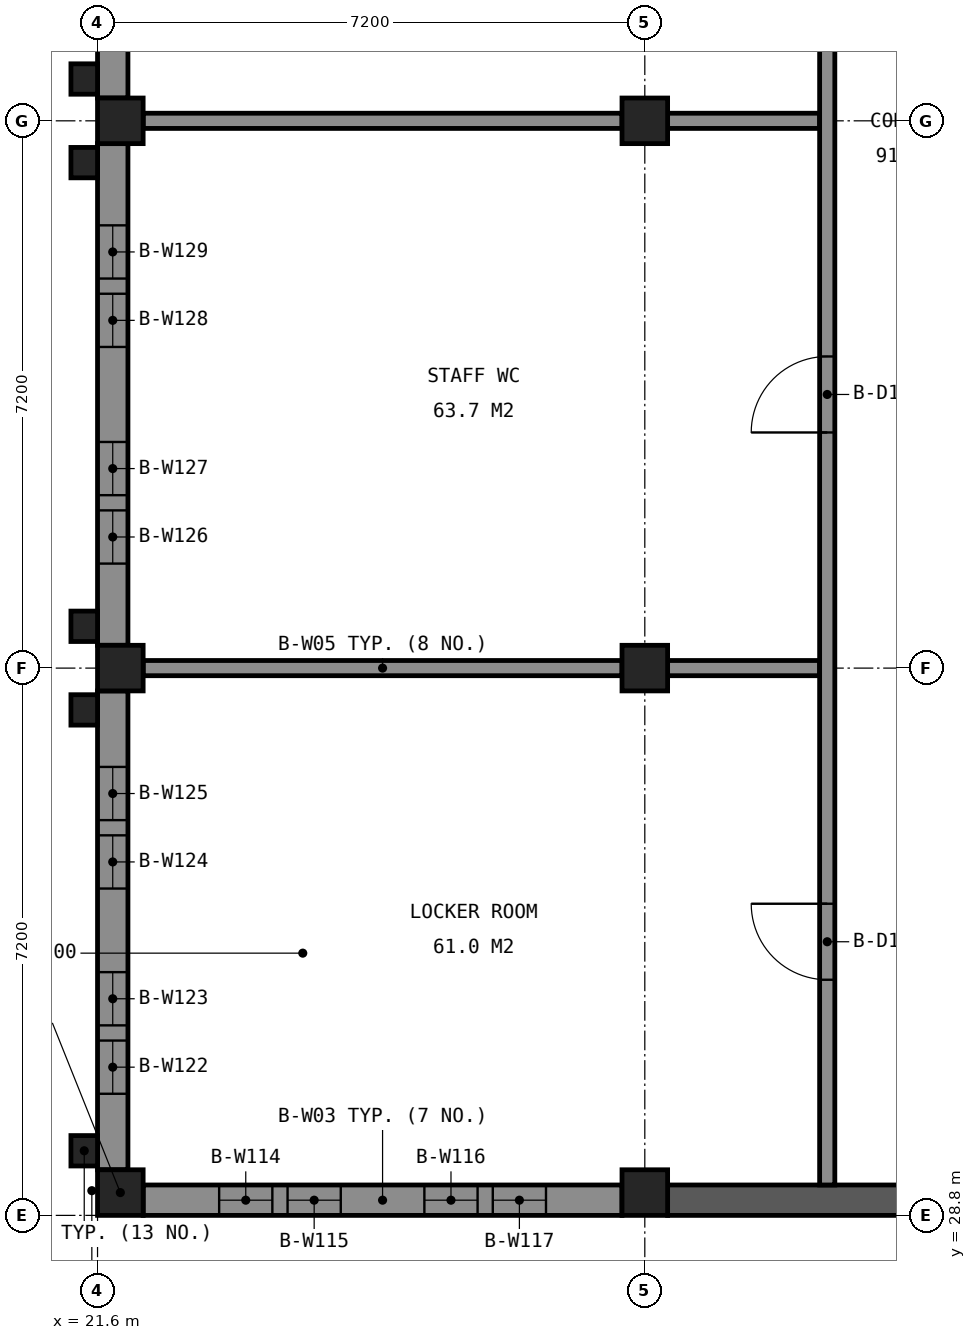
"""IFC4 building model, lengths in metres.
Left out: names, types, materials, properties, quantities, classifications, styles, units other than length and angle.
Written with IfcOpenShell. Run it as: python <this file> out.ifc"""

import sys

from ifc_helpers import new_model, si_unit, direction, frame, frame_2d, origin, origin_2d, place, context, subcontext, project, spatial, rectangle, extrude, element, fill, save


model = new_model("IFC4")
c1 = context("Model", 3, precision=1e-05, world=origin(), true_north=direction((0.0, 1.0)))
c2 = subcontext(c1, "Body", "Model", "MODEL_VIEW")
j1 = project(units=[si_unit("LENGTHUNIT", "METRE"), si_unit("PLANEANGLEUNIT", "RADIAN")], contexts=[c1])
p1 = place(None, origin())
s1 = spatial("IfcSite", under=j1, at=p1, CompositionType="ELEMENT")
p2 = place(p1, origin())
s2 = spatial("IfcBuilding", under=s1, at=p2, CompositionType="ELEMENT")
p3 = place(p2, frame((0.0, 0.0, 9.6)))
s3 = spatial("IfcBuildingStorey", under=s2, at=p3, CompositionType="ELEMENT", Elevation=9.6)
for number, where, z_axis, x_axis in (
    (1, (21.9, 29.1, 0.0), (0.0, 0.0, 1.0), (1.0, 0.0, 0.0)),
    (2, (21.9, 36.0, 0.0), (0.0, 0.0, 1.0), (1.0, 0.0, 0.0)),
    (3, (21.9, 43.2, 0.0), (0.0, 0.0, 1.0), (1.0, 0.0, 0.0)),
    (4, (28.8, 29.1, 0.0), (0.0, 0.0, 1.0), (1.0, 0.0, 0.0)),
    (5, (28.8, 36.0, 0.0), (0.0, 0.0, 1.0), (1.0, 0.0, 0.0)),
    (6, (28.8, 43.2, 0.0), (0.0, 0.0, 1.0), (1.0, 0.0, 0.0)),
):
    element("IfcColumn", number, at=place(p3, frame(where, z_axis=z_axis, x_axis=x_axis)), inside=s3, PredefinedType="COLUMN", context=c2, shape_type="SweptSolid", body=[
        extrude(rectangle(XDim=0.6, YDim=0.6, at=origin_2d()), origin(), (0.0, 0.0, 1.0), 4.8),
    ])
p4 = place(p3, frame((29.1, 29.0, 0.0), z_axis=(0.0, 0.0, 1.0), x_axis=(1.0, 0.0, 0.0)))
e7 = element("IfcWall", 7, at=p4, inside=s3, PredefinedType="SHEAR", context=c2, shape_type="SweptSolid", body=[
    extrude(rectangle(XDim=13.7, YDim=0.4, at=frame_2d((6.85, 0.0))), origin(), (0.0, 0.0, 1.0), 4.55),
])
p5 = place(p3, frame((22.2, 29.0, 0.0), z_axis=(0.0, 0.0, 1.0), x_axis=(1.0, 0.0, 0.0)))
e8 = element("IfcWall", 8, at=p5, inside=s3, PredefinedType="SOLIDWALL", context=c2, shape_type="SweptSolid", body=[
    extrude(rectangle(XDim=6.3, YDim=0.4, at=frame_2d((3.15, 0.0))), origin(), (0.0, 0.0, 1.0), 3.95),
])
p6 = place(p5, frame((1.0, 0.0, 0.9)))
e9 = element("IfcOpeningElement", 9, at=p6, cuts=e8, PredefinedType="OPENING", context=c2, shape_type="SweptSolid", body=[
    extrude(rectangle(XDim=0.7, YDim=2.4, at=frame_2d((0.35, 1.2))), frame((0.0, 0.21, 0.0), z_axis=(0.0, -1.0, 0.0), x_axis=(1.0, 0.0, 0.0)), (0.0, 0.0, 1.0), 0.42),
])
p7 = place(p5, frame((1.9, 0.0, 0.9)))
e10 = element("IfcOpeningElement", 10, at=p7, cuts=e8, PredefinedType="OPENING", context=c2, shape_type="SweptSolid", body=[
    extrude(rectangle(XDim=0.7, YDim=2.4, at=frame_2d((0.35, 1.2))), frame((0.0, 0.21, 0.0), z_axis=(0.0, -1.0, 0.0), x_axis=(1.0, 0.0, 0.0)), (0.0, 0.0, 1.0), 0.42),
])
p8 = place(p5, frame((3.7, 0.0, 0.9)))
e11 = element("IfcOpeningElement", 11, at=p8, cuts=e8, PredefinedType="OPENING", context=c2, shape_type="SweptSolid", body=[
    extrude(rectangle(XDim=0.7, YDim=2.4, at=frame_2d((0.35, 1.2))), frame((0.0, 0.21, 0.0), z_axis=(0.0, -1.0, 0.0), x_axis=(1.0, 0.0, 0.0)), (0.0, 0.0, 1.0), 0.42),
])
p9 = place(p5, frame((4.6, 0.0, 0.9)))
e12 = element("IfcOpeningElement", 12, at=p9, cuts=e8, PredefinedType="OPENING", context=c2, shape_type="SweptSolid", body=[
    extrude(rectangle(XDim=0.7, YDim=2.4, at=frame_2d((0.35, 1.2))), frame((0.0, 0.21, 0.0), z_axis=(0.0, -1.0, 0.0), x_axis=(1.0, 0.0, 0.0)), (0.0, 0.0, 1.0), 0.42),
])
p10 = place(p3, frame((21.8, 29.4, 0.0), z_axis=(0.0, 0.0, 1.0), x_axis=(0.0, 1.0, 0.0)))
e13 = element("IfcWall", 13, at=p10, inside=s3, PredefinedType="SOLIDWALL", context=c2, shape_type="SweptSolid", body=[
    extrude(rectangle(XDim=6.3, YDim=0.4, at=frame_2d((3.15, 0.0))), origin(), (0.0, 0.0, 1.0), 3.95),
])
p11 = place(p10, frame((1.0, 0.0, 0.9)))
e14 = element("IfcOpeningElement", 14, at=p11, cuts=e13, PredefinedType="OPENING", context=c2, shape_type="SweptSolid", body=[
    extrude(rectangle(XDim=0.7, YDim=2.4, at=frame_2d((0.35, 1.2))), frame((0.0, 0.21, 0.0), z_axis=(0.0, -1.0, 0.0), x_axis=(1.0, 0.0, 0.0)), (0.0, 0.0, 1.0), 0.42),
])
p12 = place(p10, frame((1.9, 0.0, 0.9)))
e15 = element("IfcOpeningElement", 15, at=p12, cuts=e13, PredefinedType="OPENING", context=c2, shape_type="SweptSolid", body=[
    extrude(rectangle(XDim=0.7, YDim=2.4, at=frame_2d((0.35, 1.2))), frame((0.0, 0.21, 0.0), z_axis=(0.0, -1.0, 0.0), x_axis=(1.0, 0.0, 0.0)), (0.0, 0.0, 1.0), 0.42),
])
p13 = place(p10, frame((3.7, 0.0, 0.9)))
e16 = element("IfcOpeningElement", 16, at=p13, cuts=e13, PredefinedType="OPENING", context=c2, shape_type="SweptSolid", body=[
    extrude(rectangle(XDim=0.7, YDim=2.4, at=frame_2d((0.35, 1.2))), frame((0.0, 0.21, 0.0), z_axis=(0.0, -1.0, 0.0), x_axis=(1.0, 0.0, 0.0)), (0.0, 0.0, 1.0), 0.42),
])
p14 = place(p10, frame((4.6, 0.0, 0.9)))
e17 = element("IfcOpeningElement", 17, at=p14, cuts=e13, PredefinedType="OPENING", context=c2, shape_type="SweptSolid", body=[
    extrude(rectangle(XDim=0.7, YDim=2.4, at=frame_2d((0.35, 1.2))), frame((0.0, 0.21, 0.0), z_axis=(0.0, -1.0, 0.0), x_axis=(1.0, 0.0, 0.0)), (0.0, 0.0, 1.0), 0.42),
])
p15 = place(p3, frame((21.8, 36.3, 0.0), z_axis=(0.0, 0.0, 1.0), x_axis=(0.0, 1.0, 0.0)))
e18 = element("IfcWall", 18, at=p15, inside=s3, PredefinedType="SOLIDWALL", context=c2, shape_type="SweptSolid", body=[
    extrude(rectangle(XDim=6.6, YDim=0.4, at=frame_2d((3.3, 0.0))), origin(), (0.0, 0.0, 1.0), 3.95),
])
p16 = place(p15, frame((1.075, 0.0, 0.9)))
e19 = element("IfcOpeningElement", 19, at=p16, cuts=e18, PredefinedType="OPENING", context=c2, shape_type="SweptSolid", body=[
    extrude(rectangle(XDim=0.7, YDim=2.4, at=frame_2d((0.35, 1.2))), frame((0.0, 0.21, 0.0), z_axis=(0.0, -1.0, 0.0), x_axis=(1.0, 0.0, 0.0)), (0.0, 0.0, 1.0), 0.42),
])
p17 = place(p15, frame((1.975, 0.0, 0.9)))
e20 = element("IfcOpeningElement", 20, at=p17, cuts=e18, PredefinedType="OPENING", context=c2, shape_type="SweptSolid", body=[
    extrude(rectangle(XDim=0.7, YDim=2.4, at=frame_2d((0.35, 1.2))), frame((0.0, 0.21, 0.0), z_axis=(0.0, -1.0, 0.0), x_axis=(1.0, 0.0, 0.0)), (0.0, 0.0, 1.0), 0.42),
])
p18 = place(p15, frame((3.925, 0.0, 0.9)))
e21 = element("IfcOpeningElement", 21, at=p18, cuts=e18, PredefinedType="OPENING", context=c2, shape_type="SweptSolid", body=[
    extrude(rectangle(XDim=0.7, YDim=2.4, at=frame_2d((0.35, 1.2))), frame((0.0, 0.21, 0.0), z_axis=(0.0, -1.0, 0.0), x_axis=(1.0, 0.0, 0.0)), (0.0, 0.0, 1.0), 0.42),
])
p19 = place(p15, frame((4.825, 0.0, 0.9)))
e22 = element("IfcOpeningElement", 22, at=p19, cuts=e18, PredefinedType="OPENING", context=c2, shape_type="SweptSolid", body=[
    extrude(rectangle(XDim=0.7, YDim=2.4, at=frame_2d((0.35, 1.2))), frame((0.0, 0.21, 0.0), z_axis=(0.0, -1.0, 0.0), x_axis=(1.0, 0.0, 0.0)), (0.0, 0.0, 1.0), 0.42),
])
p20 = place(p3, frame((21.8, 43.5, 0.0), z_axis=(0.0, 0.0, 1.0), x_axis=(0.0, 1.0, 0.0)))
e23 = element("IfcWall", 23, at=p20, inside=s3, PredefinedType="SOLIDWALL", context=c2, shape_type="SweptSolid", body=[
    extrude(rectangle(XDim=6.6, YDim=0.4, at=frame_2d((3.3, 0.0))), origin(), (0.0, 0.0, 1.0), 3.95),
])
p21 = place(p20, frame((1.075, 0.0, 0.9)))
e24 = element("IfcOpeningElement", 24, at=p21, cuts=e23, PredefinedType="OPENING", context=c2, shape_type="SweptSolid", body=[
    extrude(rectangle(XDim=0.7, YDim=2.4, at=frame_2d((0.35, 1.2))), frame((0.0, 0.21, 0.0), z_axis=(0.0, -1.0, 0.0), x_axis=(1.0, 0.0, 0.0)), (0.0, 0.0, 1.0), 0.42),
])
p22 = place(p20, frame((1.975, 0.0, 0.9)))
e25 = element("IfcOpeningElement", 25, at=p22, cuts=e23, PredefinedType="OPENING", context=c2, shape_type="SweptSolid", body=[
    extrude(rectangle(XDim=0.7, YDim=2.4, at=frame_2d((0.35, 1.2))), frame((0.0, 0.21, 0.0), z_axis=(0.0, -1.0, 0.0), x_axis=(1.0, 0.0, 0.0)), (0.0, 0.0, 1.0), 0.42),
])
p23 = place(p20, frame((3.925, 0.0, 0.9)))
e26 = element("IfcOpeningElement", 26, at=p23, cuts=e23, PredefinedType="OPENING", context=c2, shape_type="SweptSolid", body=[
    extrude(rectangle(XDim=0.7, YDim=2.4, at=frame_2d((0.35, 1.2))), frame((0.0, 0.21, 0.0), z_axis=(0.0, -1.0, 0.0), x_axis=(1.0, 0.0, 0.0)), (0.0, 0.0, 1.0), 0.42),
])
p24 = place(p20, frame((4.825, 0.0, 0.9)))
e27 = element("IfcOpeningElement", 27, at=p24, cuts=e23, PredefinedType="OPENING", context=c2, shape_type="SweptSolid", body=[
    extrude(rectangle(XDim=0.7, YDim=2.4, at=frame_2d((0.35, 1.2))), frame((0.0, 0.21, 0.0), z_axis=(0.0, -1.0, 0.0), x_axis=(1.0, 0.0, 0.0)), (0.0, 0.0, 1.0), 0.42),
])
for number, where, z_axis, x_axis in (
    (28, (21.425, 29.65, 0.0), (0.0, 0.0, 1.0), (1.0, 0.0, 0.0)),
    (29, (21.425, 35.45, 0.0), (0.0, 0.0, 1.0), (1.0, 0.0, 0.0)),
    (30, (21.425, 36.55, 0.0), (0.0, 0.0, 1.0), (1.0, 0.0, 0.0)),
    (31, (21.425, 42.65, 0.0), (0.0, 0.0, 1.0), (1.0, 0.0, 0.0)),
    (32, (21.425, 43.75, 0.0), (0.0, 0.0, 1.0), (1.0, 0.0, 0.0)),
):
    element("IfcColumn", number, at=place(p3, frame(where, z_axis=z_axis, x_axis=x_axis)), inside=s3, PredefinedType="COLUMN", context=c2, shape_type="SweptSolid", body=[
        extrude(rectangle(XDim=0.35, YDim=0.4, at=origin_2d()), origin(), (0.0, 0.0, 1.0), 4.8),
    ])
p25 = place(p3, frame((21.525, 28.8, -0.15), z_axis=(0.0, 0.0, 1.0), x_axis=(0.0, 1.0, 0.0)))
e33 = element("IfcWall", 33, at=p25, inside=s3, PredefinedType="SOLIDWALL", context=c2, shape_type="SweptSolid", body=[
    extrude(rectangle(XDim=0.65, YDim=0.15, at=frame_2d((0.325, 0.0))), origin(), (0.0, 0.0, 1.0), 0.3),
])
p26 = place(p3, frame((21.525, 29.85, -0.15), z_axis=(0.0, 0.0, 1.0), x_axis=(0.0, 1.0, 0.0)))
e34 = element("IfcWall", 34, at=p26, inside=s3, PredefinedType="SOLIDWALL", context=c2, shape_type="SweptSolid", body=[
    extrude(rectangle(XDim=5.4, YDim=0.15, at=frame_2d((2.7, 0.0))), origin(), (0.0, 0.0, 1.0), 0.3),
])
p27 = place(p3, frame((21.525, 35.65, -0.15), z_axis=(0.0, 0.0, 1.0), x_axis=(0.0, 1.0, 0.0)))
e35 = element("IfcWall", 35, at=p27, inside=s3, PredefinedType="SOLIDWALL", context=c2, shape_type="SweptSolid", body=[
    extrude(rectangle(XDim=0.7, YDim=0.15, at=frame_2d((0.35, 0.0))), origin(), (0.0, 0.0, 1.0), 0.3),
])
p28 = place(p3, frame((21.525, 36.75, -0.15), z_axis=(0.0, 0.0, 1.0), x_axis=(0.0, 1.0, 0.0)))
e36 = element("IfcWall", 36, at=p28, inside=s3, PredefinedType="SOLIDWALL", context=c2, shape_type="SweptSolid", body=[
    extrude(rectangle(XDim=5.7, YDim=0.15, at=frame_2d((2.85, 0.0))), origin(), (0.0, 0.0, 1.0), 0.3),
])
p29 = place(p3, frame((21.525, 42.85, -0.15), z_axis=(0.0, 0.0, 1.0), x_axis=(0.0, 1.0, 0.0)))
e37 = element("IfcWall", 37, at=p29, inside=s3, PredefinedType="SOLIDWALL", context=c2, shape_type="SweptSolid", body=[
    extrude(rectangle(XDim=0.7, YDim=0.15, at=frame_2d((0.35, 0.0))), origin(), (0.0, 0.0, 1.0), 0.3),
])
p30 = place(p3, frame((21.525, 43.95, -0.15), z_axis=(0.0, 0.0, 1.0), x_axis=(0.0, 1.0, 0.0)))
e38 = element("IfcWall", 38, at=p30, inside=s3, PredefinedType="SOLIDWALL", context=c2, shape_type="SweptSolid", body=[
    extrude(rectangle(XDim=5.7, YDim=0.15, at=frame_2d((2.85, 0.0))), origin(), (0.0, 0.0, 1.0), 0.3),
])
p31 = place(p3, frame((22.2, 36.0, 0.0), z_axis=(0.0, 0.0, 1.0), x_axis=(1.0, 0.0, 0.0)))
e39 = element("IfcWall", 39, at=p31, inside=s3, PredefinedType="PARTITIONING", context=c2, shape_type="SweptSolid", body=[
    extrude(rectangle(XDim=6.3, YDim=0.2, at=frame_2d((3.15, 0.0))), origin(), (0.0, 0.0, 1.0), 3.95),
])
p32 = place(p3, frame((29.1, 36.0, 0.0), z_axis=(0.0, 0.0, 1.0), x_axis=(1.0, 0.0, 0.0)))
e40 = element("IfcWall", 40, at=p32, inside=s3, PredefinedType="PARTITIONING", context=c2, shape_type="SweptSolid", body=[
    extrude(rectangle(XDim=2.0, YDim=0.2, at=frame_2d((1.0, 0.0))), origin(), (0.0, 0.0, 1.0), 3.95),
])
p33 = place(p3, frame((22.2, 43.2, 0.0), z_axis=(0.0, 0.0, 1.0), x_axis=(1.0, 0.0, 0.0)))
e41 = element("IfcWall", 41, at=p33, inside=s3, PredefinedType="PARTITIONING", context=c2, shape_type="SweptSolid", body=[
    extrude(rectangle(XDim=6.3, YDim=0.2, at=frame_2d((3.15, 0.0))), origin(), (0.0, 0.0, 1.0), 3.95),
])
p34 = place(p3, frame((29.1, 43.2, 0.0), z_axis=(0.0, 0.0, 1.0), x_axis=(1.0, 0.0, 0.0)))
e42 = element("IfcWall", 42, at=p34, inside=s3, PredefinedType="PARTITIONING", context=c2, shape_type="SweptSolid", body=[
    extrude(rectangle(XDim=2.0, YDim=0.2, at=frame_2d((1.0, 0.0))), origin(), (0.0, 0.0, 1.0), 3.95),
])
p35 = place(p3, frame((31.2, 29.2, 0.0), z_axis=(0.0, 0.0, 1.0), x_axis=(0.0, 1.0, 0.0)))
e43 = element("IfcWall", 43, at=p35, inside=s3, PredefinedType="PARTITIONING", context=c2, shape_type="SweptSolid", body=[
    extrude(rectangle(XDim=42.4, YDim=0.2, at=frame_2d((21.2, 0.0))), origin(), (0.0, 0.0, 1.0), 3.95),
])
p36 = place(p35, frame((2.7, 0.0, 0.0)))
e44 = element("IfcOpeningElement", 44, at=p36, cuts=e43, PredefinedType="OPENING", context=c2, shape_type="SweptSolid", body=[
    extrude(rectangle(XDim=1.0, YDim=2.1, at=frame_2d((0.5, 1.05))), frame((0.0, 0.11, 0.0), z_axis=(0.0, -1.0, 0.0), x_axis=(1.0, 0.0, 0.0)), (0.0, 0.0, 1.0), 0.22),
])
p37 = place(p35, frame((9.9, 0.0, 0.0)))
e45 = element("IfcOpeningElement", 45, at=p37, cuts=e43, PredefinedType="OPENING", context=c2, shape_type="SweptSolid", body=[
    extrude(rectangle(XDim=1.0, YDim=2.1, at=frame_2d((0.5, 1.05))), frame((0.0, 0.11, 0.0), z_axis=(0.0, -1.0, 0.0), x_axis=(1.0, 0.0, 0.0)), (0.0, 0.0, 1.0), 0.22),
])
p38 = place(p35, frame((17.9, 0.0, 0.0)))
e46 = element("IfcOpeningElement", 46, at=p38, cuts=e43, PredefinedType="OPENING", context=c2, shape_type="SweptSolid", body=[
    extrude(rectangle(XDim=1.8, YDim=2.1, at=frame_2d((0.9, 1.05))), frame((0.0, 0.11, 0.0), z_axis=(0.0, -1.0, 0.0), x_axis=(1.0, 0.0, 0.0)), (0.0, 0.0, 1.0), 0.22),
])
p39 = place(p35, frame((27.5, 0.0, 0.0)))
e47 = element("IfcOpeningElement", 47, at=p39, cuts=e43, PredefinedType="OPENING", context=c2, shape_type="SweptSolid", body=[
    extrude(rectangle(XDim=1.8, YDim=2.1, at=frame_2d((0.9, 1.05))), frame((0.0, 0.11, 0.0), z_axis=(0.0, -1.0, 0.0), x_axis=(1.0, 0.0, 0.0)), (0.0, 0.0, 1.0), 0.22),
])
p40 = place(p35, frame((37.1, 0.0, 0.0)))
e48 = element("IfcOpeningElement", 48, at=p40, cuts=e43, PredefinedType="OPENING", context=c2, shape_type="SweptSolid", body=[
    extrude(rectangle(XDim=1.8, YDim=2.1, at=frame_2d((0.9, 1.05))), frame((0.0, 0.11, 0.0), z_axis=(0.0, -1.0, 0.0), x_axis=(1.0, 0.0, 0.0)), (0.0, 0.0, 1.0), 0.22),
])
p41 = place(p6, origin())
e49 = element("IfcWindow", 49, at=p41, inside=s3, PartitioningType="SINGLE_PANEL", PredefinedType="WINDOW", context=c2, shape_type="SweptSolid", body=[
    extrude(rectangle(XDim=0.7, YDim=2.4, at=frame_2d((0.35, 1.2))), frame((0.0, 0.03, 0.0), z_axis=(0.0, -1.0, 0.0), x_axis=(1.0, 0.0, 0.0)), (0.0, 0.0, 1.0), 0.06),
])
fill(e9, e49)
p42 = place(p7, origin())
e50 = element("IfcWindow", 50, at=p42, inside=s3, PartitioningType="SINGLE_PANEL", PredefinedType="WINDOW", context=c2, shape_type="SweptSolid", body=[
    extrude(rectangle(XDim=0.7, YDim=2.4, at=frame_2d((0.35, 1.2))), frame((0.0, 0.03, 0.0), z_axis=(0.0, -1.0, 0.0), x_axis=(1.0, 0.0, 0.0)), (0.0, 0.0, 1.0), 0.06),
])
fill(e10, e50)
p43 = place(p8, origin())
e51 = element("IfcWindow", 51, at=p43, inside=s3, PartitioningType="SINGLE_PANEL", PredefinedType="WINDOW", context=c2, shape_type="SweptSolid", body=[
    extrude(rectangle(XDim=0.7, YDim=2.4, at=frame_2d((0.35, 1.2))), frame((0.0, 0.03, 0.0), z_axis=(0.0, -1.0, 0.0), x_axis=(1.0, 0.0, 0.0)), (0.0, 0.0, 1.0), 0.06),
])
fill(e11, e51)
p44 = place(p9, origin())
e52 = element("IfcWindow", 52, at=p44, inside=s3, PartitioningType="SINGLE_PANEL", PredefinedType="WINDOW", context=c2, shape_type="SweptSolid", body=[
    extrude(rectangle(XDim=0.7, YDim=2.4, at=frame_2d((0.35, 1.2))), frame((0.0, 0.03, 0.0), z_axis=(0.0, -1.0, 0.0), x_axis=(1.0, 0.0, 0.0)), (0.0, 0.0, 1.0), 0.06),
])
fill(e12, e52)
p45 = place(p11, origin())
e53 = element("IfcWindow", 53, at=p45, inside=s3, PartitioningType="SINGLE_PANEL", PredefinedType="WINDOW", context=c2, shape_type="SweptSolid", body=[
    extrude(rectangle(XDim=0.7, YDim=2.4, at=frame_2d((0.35, 1.2))), frame((0.0, 0.03, 0.0), z_axis=(0.0, -1.0, 0.0), x_axis=(1.0, 0.0, 0.0)), (0.0, 0.0, 1.0), 0.06),
])
fill(e14, e53)
p46 = place(p12, origin())
e54 = element("IfcWindow", 54, at=p46, inside=s3, PartitioningType="SINGLE_PANEL", PredefinedType="WINDOW", context=c2, shape_type="SweptSolid", body=[
    extrude(rectangle(XDim=0.7, YDim=2.4, at=frame_2d((0.35, 1.2))), frame((0.0, 0.03, 0.0), z_axis=(0.0, -1.0, 0.0), x_axis=(1.0, 0.0, 0.0)), (0.0, 0.0, 1.0), 0.06),
])
fill(e15, e54)
p47 = place(p13, origin())
e55 = element("IfcWindow", 55, at=p47, inside=s3, PartitioningType="SINGLE_PANEL", PredefinedType="WINDOW", context=c2, shape_type="SweptSolid", body=[
    extrude(rectangle(XDim=0.7, YDim=2.4, at=frame_2d((0.35, 1.2))), frame((0.0, 0.03, 0.0), z_axis=(0.0, -1.0, 0.0), x_axis=(1.0, 0.0, 0.0)), (0.0, 0.0, 1.0), 0.06),
])
fill(e16, e55)
p48 = place(p14, origin())
e56 = element("IfcWindow", 56, at=p48, inside=s3, PartitioningType="SINGLE_PANEL", PredefinedType="WINDOW", context=c2, shape_type="SweptSolid", body=[
    extrude(rectangle(XDim=0.7, YDim=2.4, at=frame_2d((0.35, 1.2))), frame((0.0, 0.03, 0.0), z_axis=(0.0, -1.0, 0.0), x_axis=(1.0, 0.0, 0.0)), (0.0, 0.0, 1.0), 0.06),
])
fill(e17, e56)
p49 = place(p16, origin())
e57 = element("IfcWindow", 57, at=p49, inside=s3, PartitioningType="SINGLE_PANEL", PredefinedType="WINDOW", context=c2, shape_type="SweptSolid", body=[
    extrude(rectangle(XDim=0.7, YDim=2.4, at=frame_2d((0.35, 1.2))), frame((0.0, 0.03, 0.0), z_axis=(0.0, -1.0, 0.0), x_axis=(1.0, 0.0, 0.0)), (0.0, 0.0, 1.0), 0.06),
])
fill(e19, e57)
p50 = place(p17, origin())
e58 = element("IfcWindow", 58, at=p50, inside=s3, PartitioningType="SINGLE_PANEL", PredefinedType="WINDOW", context=c2, shape_type="SweptSolid", body=[
    extrude(rectangle(XDim=0.7, YDim=2.4, at=frame_2d((0.35, 1.2))), frame((0.0, 0.03, 0.0), z_axis=(0.0, -1.0, 0.0), x_axis=(1.0, 0.0, 0.0)), (0.0, 0.0, 1.0), 0.06),
])
fill(e20, e58)
p51 = place(p18, origin())
e59 = element("IfcWindow", 59, at=p51, inside=s3, PartitioningType="SINGLE_PANEL", PredefinedType="WINDOW", context=c2, shape_type="SweptSolid", body=[
    extrude(rectangle(XDim=0.7, YDim=2.4, at=frame_2d((0.35, 1.2))), frame((0.0, 0.03, 0.0), z_axis=(0.0, -1.0, 0.0), x_axis=(1.0, 0.0, 0.0)), (0.0, 0.0, 1.0), 0.06),
])
fill(e21, e59)
p52 = place(p19, origin())
e60 = element("IfcWindow", 60, at=p52, inside=s3, PartitioningType="SINGLE_PANEL", PredefinedType="WINDOW", context=c2, shape_type="SweptSolid", body=[
    extrude(rectangle(XDim=0.7, YDim=2.4, at=frame_2d((0.35, 1.2))), frame((0.0, 0.03, 0.0), z_axis=(0.0, -1.0, 0.0), x_axis=(1.0, 0.0, 0.0)), (0.0, 0.0, 1.0), 0.06),
])
fill(e22, e60)
p53 = place(p36, origin())
e61 = element("IfcDoor", 61, at=p53, inside=s3, OperationType="SINGLE_SWING_RIGHT", PredefinedType="DOOR", context=c2, shape_type="SweptSolid", body=[
    extrude(rectangle(XDim=1.0, YDim=2.1, at=frame_2d((0.5, 1.05))), frame((0.0, 0.025, 0.0), z_axis=(0.0, -1.0, 0.0), x_axis=(1.0, 0.0, 0.0)), (0.0, 0.0, 1.0), 0.05),
])
fill(e44, e61)
p54 = place(p37, origin())
e62 = element("IfcDoor", 62, at=p54, inside=s3, OperationType="SINGLE_SWING_LEFT", PredefinedType="DOOR", context=c2, shape_type="SweptSolid", body=[
    extrude(rectangle(XDim=1.0, YDim=2.1, at=frame_2d((0.5, 1.05))), frame((0.0, 0.025, 0.0), z_axis=(0.0, -1.0, 0.0), x_axis=(1.0, 0.0, 0.0)), (0.0, 0.0, 1.0), 0.05),
])
fill(e45, e62)
save(model, sys.argv[1])
